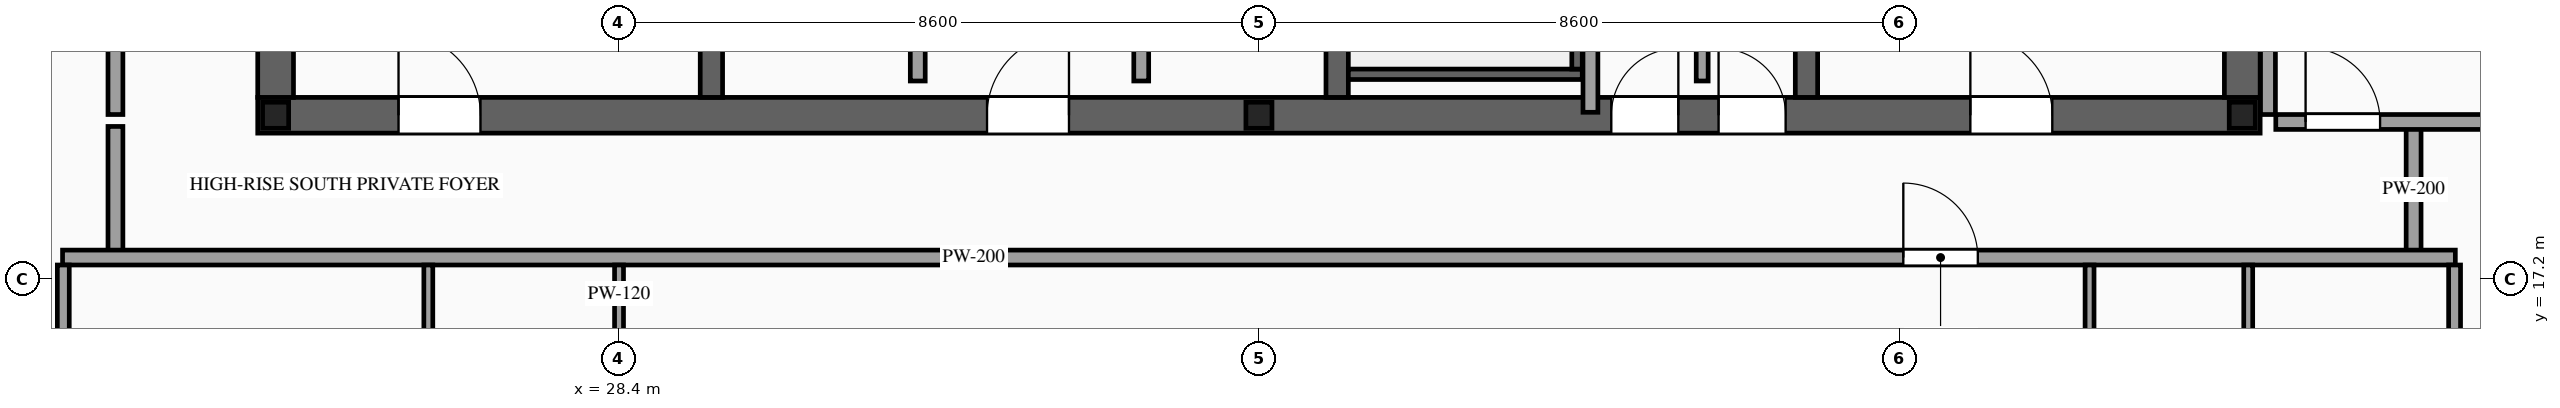
"""IFC4 building model, lengths in metres.
Left out: names, types, materials, properties, quantities, classifications, styles, units other than length and angle.
Written with IfcOpenShell. Run it as: python <this file> out.ifc"""

import sys

from ifc_helpers import new_model, si_unit, direction, frame, frame_2d, origin, origin_2d, place, context, subcontext, project, spatial, rectangle, i_section, extrude, source, transform, mapped, element, fill, save


model = new_model("IFC4")
c1 = context("Model", 3, precision=1e-05, world=origin(), true_north=direction((0.0, 1.0)))
c2 = subcontext(c1, "Body", "Model", "MODEL_VIEW")
j1 = project(units=[si_unit("LENGTHUNIT", "METRE"), si_unit("PLANEANGLEUNIT", "RADIAN")], contexts=[c1])
p1 = place(None, origin())
s1 = spatial("IfcSite", under=j1, at=p1, CompositionType="ELEMENT")
p2 = place(p1, origin())
s2 = spatial("IfcBuilding", under=s1, at=p2, CompositionType="ELEMENT")
p3 = place(p2, frame((0.0, 0.0, 339.2)))
s3 = spatial("IfcBuildingStorey", under=s2, at=p3, CompositionType="ELEMENT", Elevation=339.2)
p4 = place(p3, frame((23.56, 19.4, 0.0), z_axis=(0.0, 0.0, 1.0), x_axis=(1.0, 0.0, 0.0)))
e1 = element("IfcWall", 1, at=p4, inside=s3, PredefinedType="SHEAR", context=c2, shape_type="SweptSolid", body=[
    extrude(rectangle(XDim=26.88, YDim=0.48, at=frame_2d((13.44, 0.0))), origin(), (0.0, 0.0, 1.0), 4.0),
])
p5 = place(p4, frame((1.89, 0.0, 0.0)))
e2 = element("IfcOpeningElement", 2, at=p5, cuts=e1, PredefinedType="OPENING", context=c2, shape_type="SweptSolid", body=[
    extrude(rectangle(XDim=1.1, YDim=2.2, at=frame_2d((0.55, 1.1))), frame((0.0, 0.255, 0.0), z_axis=(0.0, -1.0, 0.0), x_axis=(1.0, 0.0, 0.0)), (0.0, 0.0, 1.0), 0.51),
])
p6 = place(p4, frame((9.79, 0.0, 0.0)))
e3 = element("IfcOpeningElement", 3, at=p6, cuts=e1, PredefinedType="OPENING", context=c2, shape_type="SweptSolid", body=[
    extrude(rectangle(XDim=1.1, YDim=2.2, at=frame_2d((0.55, 1.1))), frame((0.0, 0.255, 0.0), z_axis=(0.0, -1.0, 0.0), x_axis=(1.0, 0.0, 0.0)), (0.0, 0.0, 1.0), 0.51),
])
p7 = place(p4, frame((22.99, 0.0, 0.0)))
e4 = element("IfcOpeningElement", 4, at=p7, cuts=e1, PredefinedType="OPENING", context=c2, shape_type="SweptSolid", body=[
    extrude(rectangle(XDim=1.1, YDim=2.2, at=frame_2d((0.55, 1.1))), frame((0.0, 0.255, 0.0), z_axis=(0.0, -1.0, 0.0), x_axis=(1.0, 0.0, 0.0)), (0.0, 0.0, 1.0), 0.51),
])
p8 = place(p4, frame((19.61, 0.0, 0.0)))
e5 = element("IfcOpeningElement", 5, at=p8, cuts=e1, PredefinedType="OPENING", context=c2, shape_type="SweptSolid", body=[
    extrude(rectangle(XDim=0.9, YDim=2.15, at=frame_2d((0.45, 1.075))), frame((0.0, 0.255, 0.0), z_axis=(0.0, -1.0, 0.0), x_axis=(1.0, 0.0, 0.0)), (0.0, 0.0, 1.0), 0.51),
])
p9 = place(p4, frame((18.17, 0.0, 0.0)))
e6 = element("IfcOpeningElement", 6, at=p9, cuts=e1, PredefinedType="OPENING", context=c2, shape_type="SweptSolid", body=[
    extrude(rectangle(XDim=0.9, YDim=2.15, at=frame_2d((0.45, 1.075))), frame((0.0, 0.255, 0.0), z_axis=(0.0, -1.0, 0.0), x_axis=(1.0, 0.0, 0.0)), (0.0, 0.0, 1.0), 0.51),
])
m1 = source(origin(), c2, "Body", "SweptSolid", [
    extrude(rectangle(XDim=12.32, YDim=0.48, at=frame_2d((6.16, 0.0))), origin(), (0.0, 0.0, 1.0), 4.0),
])
for number, where, z_axis, x_axis in (
    (7, (23.8, 19.64, 0.0), (0.0, 0.0, 1.0), (0.0, 1.0, 0.0)),
    (8, (50.2, 19.64, 0.0), (0.0, 0.0, 1.0), (0.0, 1.0, 0.0)),
):
    element("IfcWall", number, at=place(p3, frame(where, z_axis=z_axis, x_axis=x_axis)), inside=s3, PredefinedType="SHEAR", context=c2, shape_type="MappedRepresentation", body=[
        mapped(m1, transform((0.0, 0.0, 0.0), scale=1.0)),
    ])
m2 = source(origin(), c2, "Body", "SweptSolid", [
    extrude(rectangle(XDim=12.32, YDim=0.3, at=frame_2d((6.16, 0.0))), origin(), (0.0, 0.0, 1.0), 4.0),
])
for number, where, z_axis, x_axis in (
    (9, (29.65, 19.64, 0.0), (0.0, 0.0, 1.0), (0.0, 1.0, 0.0)),
    (10, (38.05, 19.64, 0.0), (0.0, 0.0, 1.0), (0.0, 1.0, 0.0)),
):
    element("IfcWall", number, at=place(p3, frame(where, z_axis=z_axis, x_axis=x_axis)), inside=s3, PredefinedType="SOLIDWALL", context=c2, shape_type="MappedRepresentation", body=[
        mapped(m2, transform((0.0, 0.0, 0.0), scale=1.0)),
    ])
p10 = place(p3, frame((44.35, 19.64, 0.0), z_axis=(0.0, 0.0, 1.0), x_axis=(0.0, 1.0, 0.0)))
e11 = element("IfcWall", 11, at=p10, inside=s3, PredefinedType="SOLIDWALL", context=c2, shape_type="SweptSolid", body=[
    extrude(rectangle(XDim=12.32, YDim=0.3, at=frame_2d((6.16, 0.0))), origin(), (0.0, 0.0, 1.0), 4.0),
])
p11 = place(p10, frame((6.56, 0.0, 0.0)))
e12 = element("IfcOpeningElement", 12, at=p11, cuts=e11, PredefinedType="OPENING", context=c2, shape_type="SweptSolid", body=[
    extrude(rectangle(XDim=1.1, YDim=2.2, at=frame_2d((0.55, 1.1))), frame((0.0, 0.165, 0.0), z_axis=(0.0, -1.0, 0.0), x_axis=(1.0, 0.0, 0.0)), (0.0, 0.0, 1.0), 0.33),
])
p12 = place(p10, frame((8.66, 0.0, 0.0)))
e13 = element("IfcOpeningElement", 13, at=p12, cuts=e11, PredefinedType="OPENING", context=c2, shape_type="SweptSolid", body=[
    extrude(rectangle(XDim=1.1, YDim=2.2, at=frame_2d((0.55, 1.1))), frame((0.0, 0.165, 0.0), z_axis=(0.0, -1.0, 0.0), x_axis=(1.0, 0.0, 0.0)), (0.0, 0.0, 1.0), 0.33),
])
p13 = place(p10, frame((10.76, 0.0, 0.0)))
e14 = element("IfcOpeningElement", 14, at=p13, cuts=e11, PredefinedType="OPENING", context=c2, shape_type="SweptSolid", body=[
    extrude(rectangle(XDim=1.1, YDim=2.2, at=frame_2d((0.55, 1.1))), frame((0.0, 0.165, 0.0), z_axis=(0.0, -1.0, 0.0), x_axis=(1.0, 0.0, 0.0)), (0.0, 0.0, 1.0), 0.33),
])
m3 = source(origin(), c2, "Body", "SweptSolid", [
    extrude(i_section(OverallWidth=0.35, OverallDepth=0.35, WebThickness=0.012, FlangeThickness=0.019, at=origin_2d()), origin(), (0.0, 0.0, 1.0), 4.0),
])
for number, where, z_axis, x_axis in (
    (15, (23.8, 19.4, 0.0), (0.0, 0.0, 1.0), (1.0, 0.0, 0.0)),
    (16, (37.0, 19.4, 0.0), (0.0, 0.0, 1.0), (1.0, 0.0, 0.0)),
    (17, (50.2, 19.4, 0.0), (0.0, 0.0, 1.0), (1.0, 0.0, 0.0)),
):
    element("IfcColumn", number, at=place(p3, frame(where, z_axis=z_axis, x_axis=x_axis)), inside=s3, PredefinedType="COLUMN", context=c2, shape_type="MappedRepresentation", body=[
        mapped(m3, transform((0.0, 0.0, 0.0), scale=1.0)),
    ])
m4 = source(origin(), c2, "Body", "SweptSolid", [
    extrude(rectangle(XDim=3.14, YDim=0.14, at=frame_2d((1.57, 0.0))), origin(), (0.0, 0.0, 1.0), 3.76),
])
p14 = place(p3, frame((38.2, 19.95, 0.0), z_axis=(0.0, 0.0, 1.0), x_axis=(1.0, 0.0, 0.0)))
e18 = element("IfcWall", 18, at=p14, inside=s3, PredefinedType="SOLIDWALL", context=c2, shape_type="MappedRepresentation", body=[
    mapped(m4, transform((0.0, 0.0, 0.0), scale=1.0)),
])
m5 = source(origin(), c2, "Body", "SweptSolid", [
    extrude(rectangle(XDim=8.94, YDim=0.14, at=frame_2d((4.47, 0.0))), origin(), (0.0, 0.0, 1.0), 3.76),
])
p15 = place(p3, frame((41.27, 20.02, 0.0), z_axis=(0.0, 0.0, 1.0), x_axis=(0.0, 1.0, 0.0)))
e19 = element("IfcWall", 19, at=p15, inside=s3, PredefinedType="SOLIDWALL", context=c2, shape_type="MappedRepresentation", body=[
    mapped(m5, transform((0.0, 0.0, 0.0), scale=1.0)),
])
p16 = place(p3, frame((32.42, 19.86, 0.0), z_axis=(0.0, 0.0, 1.0), x_axis=(0.0, 1.0, 0.0)))
e20 = element("IfcWall", 20, at=p16, inside=s3, PredefinedType="PARTITIONING", context=c2, shape_type="SweptSolid", body=[
    extrude(rectangle(XDim=5.84, YDim=0.2, at=frame_2d((2.92, 0.0))), origin(), (0.0, 0.0, 1.0), 3.76),
])
p17 = place(p16, frame((2.47, 0.0, 0.0)))
e21 = element("IfcOpeningElement", 21, at=p17, cuts=e20, PredefinedType="OPENING", context=c2, shape_type="SweptSolid", body=[
    extrude(rectangle(XDim=0.9, YDim=2.15, at=frame_2d((0.45, 1.075))), frame((0.0, 0.115, 0.0), z_axis=(0.0, -1.0, 0.0), x_axis=(1.0, 0.0, 0.0)), (0.0, 0.0, 1.0), 0.23),
])
p18 = place(p3, frame((35.42, 19.86, 0.0), z_axis=(0.0, 0.0, 1.0), x_axis=(0.0, 1.0, 0.0)))
e22 = element("IfcWall", 22, at=p18, inside=s3, PredefinedType="PARTITIONING", context=c2, shape_type="SweptSolid", body=[
    extrude(rectangle(XDim=2.24, YDim=0.2, at=frame_2d((1.12, 0.0))), origin(), (0.0, 0.0, 1.0), 3.76),
])
p19 = place(p18, frame((0.67, 0.0, 0.0)))
e23 = element("IfcOpeningElement", 23, at=p19, cuts=e22, PredefinedType="OPENING", context=c2, shape_type="SweptSolid", body=[
    extrude(rectangle(XDim=0.9, YDim=2.15, at=frame_2d((0.45, 1.075))), frame((0.0, 0.115, 0.0), z_axis=(0.0, -1.0, 0.0), x_axis=(1.0, 0.0, 0.0)), (0.0, 0.0, 1.0), 0.23),
])
m6 = source(origin(), c2, "Body", "SweptSolid", [
    extrude(rectangle(XDim=1.34, YDim=0.16, at=frame_2d((0.67, 0.0))), origin(), (0.0, 0.0, 1.0), 3.76),
])
p20 = place(p3, frame((42.95, 19.86, 0.0), z_axis=(0.0, 0.0, 1.0), x_axis=(0.0, 1.0, 0.0)))
e24 = element("IfcWall", 24, at=p20, inside=s3, PredefinedType="PARTITIONING", context=c2, shape_type="MappedRepresentation", body=[
    mapped(m6, transform((0.0, 0.0, 0.0), scale=1.0)),
])
m7 = source(origin(), c2, "Body", "SweptSolid", [
    extrude(rectangle(XDim=6.06, YDim=0.2, at=frame_2d((3.03, 0.0))), origin(), (0.0, 0.0, 1.0), 3.76),
])
p21 = place(p3, frame((41.45, 19.44, 0.0), z_axis=(0.0, 0.0, 1.0), x_axis=(0.0, 1.0, 0.0)))
e25 = element("IfcWall", 25, at=p21, inside=s3, PredefinedType="PARTITIONING", context=c2, shape_type="MappedRepresentation", body=[
    mapped(m7, transform((0.0, 0.0, 0.0), scale=1.0)),
])
m8 = source(origin(), c2, "Body", "SweptSolid", [
    extrude(rectangle(XDim=1.7, YDim=0.2, at=frame_2d((0.85, 0.0))), origin(), (0.0, 0.0, 1.0), 3.76),
])
for number, where, z_axis, x_axis in (
    (26, (21.65, 17.55, 0.0), (0.0, 0.0, 1.0), (0.0, 1.0, 0.0)),
    (27, (52.5, 17.55, 0.0), (0.0, 0.0, 1.0), (0.0, 1.0, 0.0)),
):
    element("IfcWall", number, at=place(p3, frame(where, z_axis=z_axis, x_axis=x_axis)), inside=s3, PredefinedType="PARTITIONING", context=c2, shape_type="MappedRepresentation", body=[
        mapped(m8, transform((0.0, 0.0, 0.0), scale=1.0)),
    ])
p22 = place(p3, frame((20.94, 17.49, 0.0), z_axis=(0.0, 0.0, 1.0), x_axis=(1.0, 0.0, 0.0)))
e28 = element("IfcWall", 28, at=p22, inside=s3, PredefinedType="PARTITIONING", context=c2, shape_type="SweptSolid", body=[
    extrude(rectangle(XDim=32.12, YDim=0.2, at=frame_2d((16.06, 0.0))), origin(), (0.0, 0.0, 1.0), 3.76),
])
p23 = place(p22, frame((24.71, 0.0, 0.0)))
e29 = element("IfcOpeningElement", 29, at=p23, cuts=e28, PredefinedType="OPENING", context=c2, shape_type="SweptSolid", body=[
    extrude(rectangle(XDim=1.0, YDim=2.2, at=frame_2d((0.5, 1.1))), frame((0.0, 0.115, 0.0), z_axis=(0.0, -1.0, 0.0), x_axis=(1.0, 0.0, 0.0)), (0.0, 0.0, 1.0), 0.23),
])
m9 = source(origin(), c2, "Body", "SweptSolid", [
    extrude(rectangle(XDim=10.39, YDim=0.16, at=frame_2d((5.195, 0.0))), origin(), (0.0, 0.0, 1.0), 3.76),
])
for number, where, z_axis, x_axis in (
    (30, (20.95, 7.0, 0.0), (0.0, 0.0, 1.0), (0.0, 1.0, 0.0)),
    (31, (53.05, 7.0, 0.0), (0.0, 0.0, 1.0), (0.0, 1.0, 0.0)),
):
    element("IfcWall", number, at=place(p3, frame(where, z_axis=z_axis, x_axis=x_axis)), inside=s3, PredefinedType="PARTITIONING", context=c2, shape_type="MappedRepresentation", body=[
        mapped(m9, transform((0.0, 0.0, 0.0), scale=1.0)),
    ])
m10 = source(origin(), c2, "Body", "SweptSolid", [
    extrude(rectangle(XDim=2.9, YDim=0.12, at=frame_2d((1.45, 0.0))), origin(), (0.0, 0.0, 1.0), 3.76),
])
p24 = place(p3, frame((25.85, 14.49, 0.0), z_axis=(0.0, 0.0, 1.0), x_axis=(0.0, 1.0, 0.0)))
e32 = element("IfcWall", 32, at=p24, inside=s3, PredefinedType="PARTITIONING", context=c2, shape_type="MappedRepresentation", body=[
    mapped(m10, transform((0.0, 0.0, 0.0), scale=1.0)),
])
p25 = place(p3, frame((28.41, 14.49, 0.0), z_axis=(0.0, 0.0, 1.0), x_axis=(0.0, 1.0, 0.0)))
e33 = element("IfcWall", 33, at=p25, inside=s3, PredefinedType="PARTITIONING", context=c2, shape_type="SweptSolid", body=[
    extrude(rectangle(XDim=2.9, YDim=0.12, at=frame_2d((1.45, 0.0))), origin(), (0.0, 0.0, 1.0), 3.76),
])
p26 = place(p25, frame((1.025, 0.0, 0.0)))
e34 = element("IfcOpeningElement", 34, at=p26, cuts=e33, PredefinedType="OPENING", context=c2, shape_type="SweptSolid", body=[
    extrude(rectangle(XDim=0.85, YDim=2.1, at=frame_2d((0.425, 1.05))), frame((0.0, 0.075, 0.0), z_axis=(0.0, -1.0, 0.0), x_axis=(1.0, 0.0, 0.0)), (0.0, 0.0, 1.0), 0.15),
])
m11 = source(origin(), c2, "Body", "SweptSolid", [
    extrude(rectangle(XDim=2.9, YDim=0.12, at=frame_2d((1.45, 0.0))), origin(), (0.0, 0.0, 1.0), 3.305),
])
p27 = place(p3, frame((50.28, 14.49, 0.0), z_axis=(0.0, 0.0, 1.0), x_axis=(0.0, 1.0, 0.0)))
e35 = element("IfcWall", 35, at=p27, inside=s3, PredefinedType="PARTITIONING", context=c2, shape_type="MappedRepresentation", body=[
    mapped(m11, transform((0.0, 0.0, 0.0), scale=1.0)),
])
p28 = place(p3, frame((48.15, 14.49, 0.0), z_axis=(0.0, 0.0, 1.0), x_axis=(0.0, 1.0, 0.0)))
e36 = element("IfcWall", 36, at=p28, inside=s3, PredefinedType="PARTITIONING", context=c2, shape_type="MappedRepresentation", body=[
    mapped(m10, transform((0.0, 0.0, 0.0), scale=1.0)),
])
p29 = place(p3, frame((21.65, 19.41, 0.0), z_axis=(0.0, 0.0, 1.0), x_axis=(0.0, 1.0, 0.0)))
e37 = element("IfcWall", 37, at=p29, inside=s3, PredefinedType="PARTITIONING", context=c2, shape_type="SweptSolid", body=[
    extrude(rectangle(XDim=12.78, YDim=0.2, at=frame_2d((6.39, 0.0))), origin(), (0.0, 0.0, 1.0), 3.76),
])
p30 = place(p29, frame((5.89, 0.0, 0.0)))
e38 = element("IfcOpeningElement", 38, at=p30, cuts=e37, PredefinedType="OPENING", context=c2, shape_type="SweptSolid", body=[
    extrude(rectangle(XDim=1.0, YDim=2.2, at=frame_2d((0.5, 1.1))), frame((0.0, 0.115, 0.0), z_axis=(0.0, -1.0, 0.0), x_axis=(1.0, 0.0, 0.0)), (0.0, 0.0, 1.0), 0.23),
])
p31 = place(p3, frame((50.65, 19.31, 0.0), z_axis=(0.0, 0.0, 1.0), x_axis=(1.0, 0.0, 0.0)))
e39 = element("IfcWall", 39, at=p31, inside=s3, PredefinedType="PARTITIONING", context=c2, shape_type="SweptSolid", body=[
    extrude(rectangle(XDim=5.3, YDim=0.2, at=frame_2d((2.65, 0.0))), origin(), (0.0, 0.0, 1.0), 3.305),
])
p32 = place(p31, frame((0.4, 0.0, 0.0)))
e40 = element("IfcOpeningElement", 40, at=p32, cuts=e39, PredefinedType="OPENING", context=c2, shape_type="SweptSolid", body=[
    extrude(rectangle(XDim=1.0, YDim=2.2, at=frame_2d((0.5, 1.1))), frame((0.0, 0.115, 0.0), z_axis=(0.0, -1.0, 0.0), x_axis=(1.0, 0.0, 0.0)), (0.0, 0.0, 1.0), 0.23),
])
m12 = source(origin(), c2, "Body", "SweptSolid", [
    extrude(rectangle(XDim=12.78, YDim=0.2, at=frame_2d((6.39, 0.0))), origin(), (0.0, 0.0, 1.0), 3.76),
])
p33 = place(p3, frame((50.545, 19.41, 0.0), z_axis=(0.0, 0.0, 1.0), x_axis=(0.0, 1.0, 0.0)))
e41 = element("IfcWall", 41, at=p33, inside=s3, PredefinedType="PARTITIONING", context=c2, shape_type="MappedRepresentation", body=[
    mapped(m12, transform((0.0, 0.0, 0.0), scale=1.0)),
])
m13 = source(origin(), c2, "Body", "SweptSolid", [
    extrude(rectangle(XDim=1.1, YDim=2.2, at=frame_2d((0.55, 1.1))), frame((0.0, 0.025, 0.0), z_axis=(0.0, -1.0, 0.0), x_axis=(1.0, 0.0, 0.0)), (0.0, 0.0, 1.0), 0.05),
])
p34 = place(p5, origin())
e42 = element("IfcDoor", 42, at=p34, inside=s3, OperationType="SINGLE_SWING_LEFT", PredefinedType="DOOR", context=c2, shape_type="MappedRepresentation", body=[
    mapped(m13, transform((0.0, 0.0, 0.0), scale=1.0)),
])
fill(e2, e42)
p35 = place(p6, origin())
e43 = element("IfcDoor", 43, at=p35, inside=s3, OperationType="SINGLE_SWING_RIGHT", PredefinedType="DOOR", context=c2, shape_type="MappedRepresentation", body=[
    mapped(m13, transform((0.0, 0.0, 0.0), scale=1.0)),
])
fill(e3, e43)
p36 = place(p7, origin())
e44 = element("IfcDoor", 44, at=p36, inside=s3, OperationType="SINGLE_SWING_LEFT", PredefinedType="DOOR", context=c2, shape_type="MappedRepresentation", body=[
    mapped(m13, transform((0.0, 0.0, 0.0), scale=1.0)),
])
fill(e4, e44)
m14 = source(origin(), c2, "Body", "SweptSolid", [
    extrude(rectangle(XDim=0.9, YDim=2.15, at=frame_2d((0.45, 1.075))), frame((0.0, 0.025, 0.0), z_axis=(0.0, -1.0, 0.0), x_axis=(1.0, 0.0, 0.0)), (0.0, 0.0, 1.0), 0.05),
])
p37 = place(p8, origin())
e45 = element("IfcDoor", 45, at=p37, inside=s3, OperationType="SINGLE_SWING_LEFT", PredefinedType="DOOR", context=c2, shape_type="MappedRepresentation", body=[
    mapped(m14, transform((0.0, 0.0, 0.0), scale=1.0)),
])
fill(e5, e45)
p38 = place(p9, origin())
e46 = element("IfcDoor", 46, at=p38, inside=s3, OperationType="SINGLE_SWING_RIGHT", PredefinedType="DOOR", context=c2, shape_type="MappedRepresentation", body=[
    mapped(m14, transform((0.0, 0.0, 0.0), scale=1.0)),
])
fill(e6, e46)
m15 = source(origin(), c2, "Body", "SweptSolid", [
    extrude(rectangle(XDim=1.0, YDim=2.2, at=frame_2d((0.5, 1.1))), frame((0.0, 0.025, 0.0), z_axis=(0.0, -1.0, 0.0), x_axis=(1.0, 0.0, 0.0)), (0.0, 0.0, 1.0), 0.05),
])
p39 = place(p23, origin())
e47 = element("IfcDoor", 47, at=p39, inside=s3, OperationType="SINGLE_SWING_LEFT", PredefinedType="DOOR", context=c2, shape_type="MappedRepresentation", body=[
    mapped(m15, transform((0.0, 0.0, 0.0), scale=1.0)),
])
fill(e29, e47)
p40 = place(p32, origin())
e48 = element("IfcDoor", 48, at=p40, inside=s3, OperationType="SINGLE_SWING_LEFT", PredefinedType="DOOR", context=c2, shape_type="MappedRepresentation", body=[
    mapped(m15, transform((0.0, 0.0, 0.0), scale=1.0)),
])
fill(e40, e48)
save(model, sys.argv[1])
